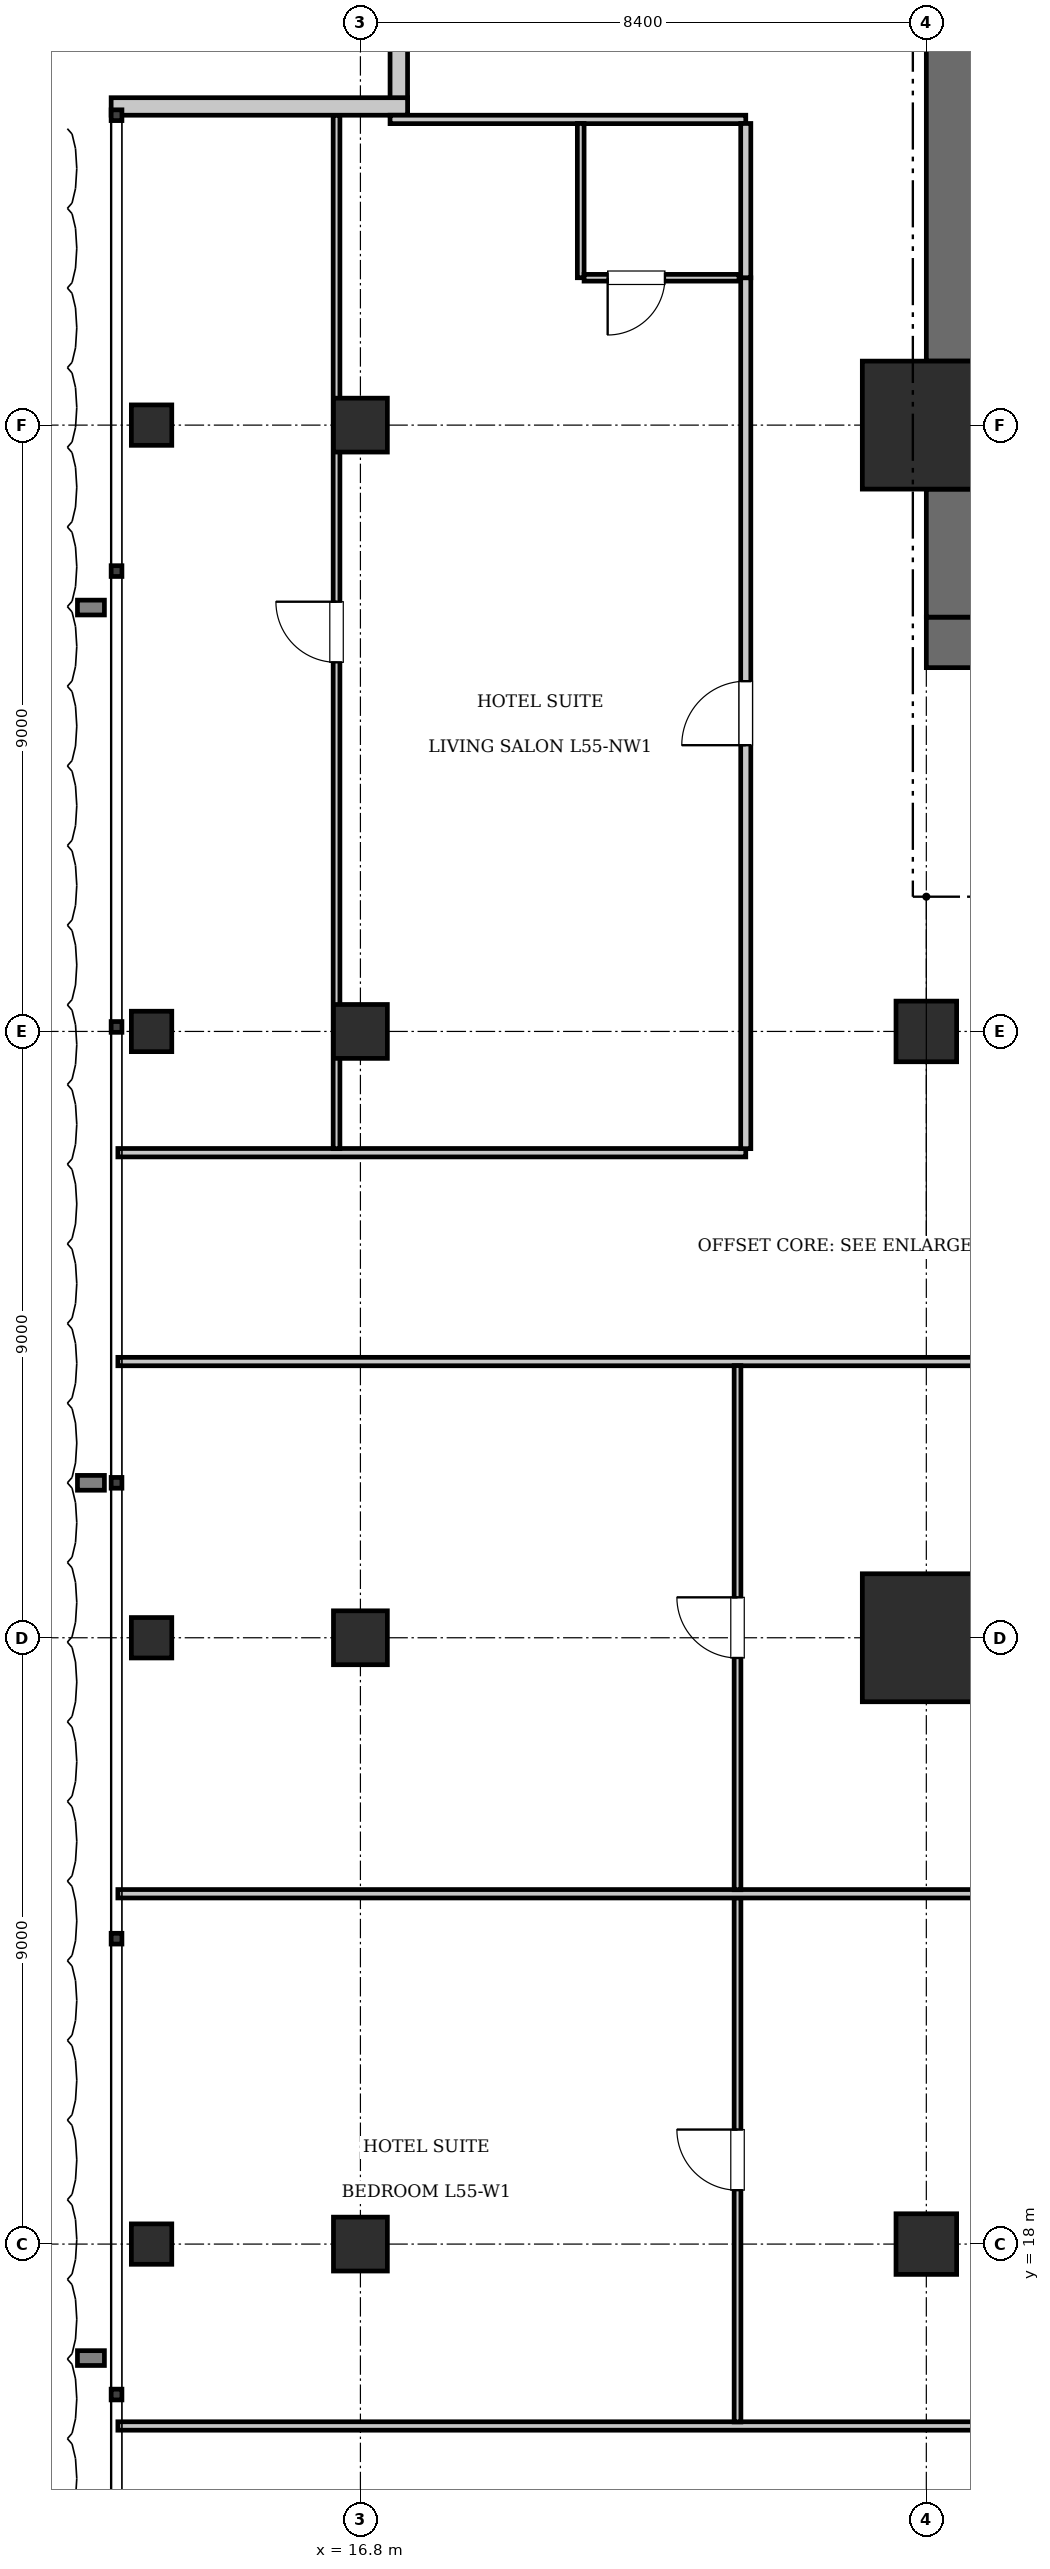
"""IFC4 building model, lengths in metres.
Left out: names, types, materials, properties, quantities, classifications, styles, units other than length and angle.
Written with IfcOpenShell. Run it as: python <this file> out.ifc"""

import sys

from ifc_helpers import new_model, si_unit, direction, frame, frame_2d, origin, origin_2d, place, context, subcontext, project, spatial, rectangle, i_section, extrude, element, fill, save


model = new_model("IFC4")
c1 = context("Model", 3, precision=1e-05, world=origin(), true_north=direction((0.0, 1.0)))
c2 = subcontext(c1, "Body", "Model", "MODEL_VIEW")
j1 = project(units=[si_unit("LENGTHUNIT", "METRE"), si_unit("PLANEANGLEUNIT", "RADIAN")], contexts=[c1])
p1 = place(None, origin())
s1 = spatial("IfcSite", under=j1, at=p1, CompositionType="ELEMENT")
p2 = place(p1, origin())
s2 = spatial("IfcBuilding", under=s1, at=p2, CompositionType="ELEMENT")
p3 = place(p2, frame((0.0, 0.0, 223.65)))
s3 = spatial("IfcBuildingStorey", under=s2, at=p3, CompositionType="ELEMENT", Elevation=223.65)
for number, where, z_axis, x_axis in (
    (1, (25.2, 27.0, 0.0), (0.0, 0.0, 1.0), (1.0, 0.0, 0.0)),
    (2, (25.2, 45.0, 0.0), (0.0, 0.0, 1.0), (1.0, 0.0, 0.0)),
):
    element("IfcColumn", number, at=place(p3, frame(where, z_axis=z_axis, x_axis=x_axis)), inside=s3, PredefinedType="COLUMN", context=c2, shape_type="SweptSolid", body=[
        extrude(rectangle(XDim=1.9, YDim=1.9, at=origin_2d()), origin(), (0.0, 0.0, 1.0), 3.85),
    ])
p4 = place(p3, frame((25.2, 41.775, 0.0), z_axis=(0.0, 0.0, 1.0), x_axis=(1.0, 0.0, 0.0)))
e3 = element("IfcWall", 3, at=p4, inside=s3, PredefinedType="SHEAR", context=c2, shape_type="SweptSolid", body=[
    extrude(rectangle(XDim=6.8, YDim=0.75, at=frame_2d((3.4, 0.0))), origin(), (0.0, 0.0, 1.0), 3.85),
])
p5 = place(p4, frame((1.65, 0.0, 0.0)))
e4 = element("IfcOpeningElement", 4, at=p5, cuts=e3, PredefinedType="OPENING", context=c2, shape_type="SweptSolid", body=[
    extrude(rectangle(XDim=1.15, YDim=2.15, at=frame_2d((0.575, 1.075))), frame((0.0, 0.385, 0.0), z_axis=(0.0, -1.0, 0.0), x_axis=(1.0, 0.0, 0.0)), (0.0, 0.0, 1.0), 0.77),
])
p6 = place(p4, frame((5.15, 0.0, 0.0)))
e5 = element("IfcOpeningElement", 5, at=p6, cuts=e3, PredefinedType="OPENING", context=c2, shape_type="SweptSolid", body=[
    extrude(rectangle(XDim=1.1, YDim=2.2, at=frame_2d((0.55, 1.1))), frame((0.0, 0.385, 0.0), z_axis=(0.0, -1.0, 0.0), x_axis=(1.0, 0.0, 0.0)), (0.0, 0.0, 1.0), 0.77),
])
p7 = place(p3, frame((25.575, 42.15, 0.0), z_axis=(0.0, 0.0, 1.0), x_axis=(0.0, 1.0, 0.0)))
e6 = element("IfcWall", 6, at=p7, inside=s3, PredefinedType="SHEAR", context=c2, shape_type="SweptSolid", body=[
    extrude(rectangle(XDim=1.9, YDim=0.75, at=frame_2d((0.95, 0.0))), origin(), (0.0, 0.0, 1.0), 3.85),
])
p8 = place(p3, frame((25.575, 45.95, 0.0), z_axis=(0.0, 0.0, 1.0), x_axis=(0.0, 1.0, 0.0)))
e7 = element("IfcWall", 7, at=p8, inside=s3, PredefinedType="SHEAR", context=c2, shape_type="SweptSolid", body=[
    extrude(rectangle(XDim=7.3, YDim=0.75, at=frame_2d((3.65, 0.0))), origin(), (0.0, 0.0, 1.0), 3.85),
])
for number, where, z_axis, x_axis in (
    (8, (25.2, 36.0, 0.0), (0.0, 0.0, 1.0), (1.0, 0.0, 0.0)),
    (9, (25.2, 18.0, 0.0), (0.0, 0.0, 1.0), (1.0, 0.0, 0.0)),
):
    element("IfcColumn", number, at=place(p3, frame(where, z_axis=z_axis, x_axis=x_axis)), inside=s3, PredefinedType="COLUMN", context=c2, shape_type="SweptSolid", body=[
        extrude(rectangle(XDim=0.9, YDim=0.9, at=origin_2d()), origin(), (0.0, 0.0, 1.0), 3.85),
    ])
for number, where, z_axis, x_axis in (
    (10, (16.8, 18.0, 0.0), (0.0, 0.0, 1.0), (1.0, 0.0, 0.0)),
    (11, (16.8, 27.0, 0.0), (0.0, 0.0, 1.0), (1.0, 0.0, 0.0)),
    (12, (16.8, 36.0, 0.0), (0.0, 0.0, 1.0), (1.0, 0.0, 0.0)),
    (13, (16.8, 45.0, 0.0), (0.0, 0.0, 1.0), (1.0, 0.0, 0.0)),
):
    element("IfcColumn", number, at=place(p3, frame(where, z_axis=z_axis, x_axis=x_axis)), inside=s3, PredefinedType="COLUMN", context=c2, shape_type="SweptSolid", body=[
        extrude(rectangle(XDim=0.8, YDim=0.8, at=origin_2d()), origin(), (0.0, 0.0, 1.0), 3.85),
    ])
for number, where, z_axis, x_axis in (
    (14, (13.7, 18.0, 0.0), (0.0, 0.0, 1.0), (1.0, 0.0, 0.0)),
    (15, (13.7, 27.0, 0.0), (0.0, 0.0, 1.0), (1.0, 0.0, 0.0)),
    (16, (13.7, 36.0, 0.0), (0.0, 0.0, 1.0), (1.0, 0.0, 0.0)),
    (17, (13.7, 45.0, 0.0), (0.0, 0.0, 1.0), (1.0, 0.0, 0.0)),
):
    element("IfcColumn", number, at=place(p3, frame(where, z_axis=z_axis, x_axis=x_axis)), inside=s3, PredefinedType="COLUMN", context=c2, shape_type="SweptSolid", body=[
        extrude(i_section(OverallWidth=0.6, OverallDepth=0.6, WebThickness=0.025, FlangeThickness=0.038, at=origin_2d()), origin(), (0.0, 0.0, 1.0), 3.85),
    ])
for number, where, z_axis, x_axis in (
    (18, (17.37, 49.6, 0.0), (0.0, 0.0, 1.0), (0.0, 1.0, 0.0)),
    (19, (13.1, 49.73, 0.0), (0.0, 0.0, 1.0), (1.0, 0.0, 0.0)),
):
    element("IfcWall", number, at=place(p3, frame(where, z_axis=z_axis, x_axis=x_axis)), inside=s3, PredefinedType="SOLIDWALL", context=c2, shape_type="SweptSolid", body=[
        extrude(rectangle(XDim=4.4, YDim=0.26, at=frame_2d((2.2, 0.0))), origin(), (0.0, 0.0, 1.0), 3.55),
    ])
for number, where, z_axis, x_axis in (
    (20, (13.2, 15.3, 0.0), (0.0, 0.0, 1.0), (1.0, 0.0, 0.0)),
    (21, (13.2, 31.1, 0.0), (0.0, 0.0, 1.0), (1.0, 0.0, 0.0)),
):
    element("IfcWall", number, at=place(p3, frame(where, z_axis=z_axis, x_axis=x_axis)), inside=s3, PredefinedType="PARTITIONING", context=c2, shape_type="SweptSolid", body=[
        extrude(rectangle(XDim=21.72, YDim=0.125, at=frame_2d((10.86, 0.0))), origin(), (0.0, 0.0, 1.0), 3.55),
    ])
p9 = place(p3, frame((22.398, 15.36, 0.0), z_axis=(0.0, 0.0, 1.0), x_axis=(0.0, 1.0, 0.0)))
e22 = element("IfcWall", 22, at=p9, inside=s3, PredefinedType="PARTITIONING", context=c2, shape_type="SweptSolid", body=[
    extrude(rectangle(XDim=7.78, YDim=0.1, at=frame_2d((3.89, 0.0))), origin(), (0.0, 0.0, 1.0), 3.55),
])
p10 = place(p9, frame((3.44, 0.0, 0.0)))
e23 = element("IfcOpeningElement", 23, at=p10, cuts=e22, PredefinedType="OPENING", context=c2, shape_type="SweptSolid", body=[
    extrude(rectangle(XDim=0.9, YDim=2.1, at=frame_2d((0.45, 1.05))), frame((0.0, 0.06, 0.0), z_axis=(0.0, -1.0, 0.0), x_axis=(1.0, 0.0, 0.0)), (0.0, 0.0, 1.0), 0.12),
])
p11 = place(p3, frame((13.2, 23.2, 0.0), z_axis=(0.0, 0.0, 1.0), x_axis=(1.0, 0.0, 0.0)))
e24 = element("IfcWall", 24, at=p11, inside=s3, PredefinedType="PARTITIONING", context=c2, shape_type="SweptSolid", body=[
    extrude(rectangle(XDim=21.72, YDim=0.125, at=frame_2d((10.86, 0.0))), origin(), (0.0, 0.0, 1.0), 3.55),
])
p12 = place(p3, frame((22.398, 23.26, 0.0), z_axis=(0.0, 0.0, 1.0), x_axis=(0.0, 1.0, 0.0)))
e25 = element("IfcWall", 25, at=p12, inside=s3, PredefinedType="PARTITIONING", context=c2, shape_type="SweptSolid", body=[
    extrude(rectangle(XDim=7.78, YDim=0.1, at=frame_2d((3.89, 0.0))), origin(), (0.0, 0.0, 1.0), 3.55),
])
p13 = place(p12, frame((3.44, 0.0, 0.0)))
e26 = element("IfcOpeningElement", 26, at=p13, cuts=e25, PredefinedType="OPENING", context=c2, shape_type="SweptSolid", body=[
    extrude(rectangle(XDim=0.9, YDim=2.1, at=frame_2d((0.45, 1.05))), frame((0.0, 0.06, 0.0), z_axis=(0.0, -1.0, 0.0), x_axis=(1.0, 0.0, 0.0)), (0.0, 0.0, 1.0), 0.12),
])
p14 = place(p3, frame((13.2, 34.2, 0.0), z_axis=(0.0, 0.0, 1.0), x_axis=(1.0, 0.0, 0.0)))
e27 = element("IfcWall", 27, at=p14, inside=s3, PredefinedType="PARTITIONING", context=c2, shape_type="SweptSolid", body=[
    extrude(rectangle(XDim=9.32, YDim=0.125, at=frame_2d((4.66, 0.0))), origin(), (0.0, 0.0, 1.0), 3.55),
])
p15 = place(p3, frame((17.24, 49.538, 0.0), z_axis=(0.0, 0.0, 1.0), x_axis=(1.0, 0.0, 0.0)))
e28 = element("IfcWall", 28, at=p15, inside=s3, PredefinedType="PARTITIONING", context=c2, shape_type="SweptSolid", body=[
    extrude(rectangle(XDim=5.28, YDim=0.125, at=frame_2d((2.64, 0.0))), origin(), (0.0, 0.0, 1.0), 3.55),
])
p16 = place(p3, frame((22.52, 34.26, 0.0), z_axis=(0.0, 0.0, 1.0), x_axis=(0.0, 1.0, 0.0)))
e29 = element("IfcWall", 29, at=p16, inside=s3, PredefinedType="PARTITIONING", context=c2, shape_type="SweptSolid", body=[
    extrude(rectangle(XDim=12.927, YDim=0.15, at=frame_2d((6.464, 0.0))), origin(), (0.0, 0.0, 1.0), 3.55),
])
p17 = place(p16, frame((5.989, 0.0, 0.0)))
e30 = element("IfcOpeningElement", 30, at=p17, cuts=e29, PredefinedType="OPENING", context=c2, shape_type="SweptSolid", body=[
    extrude(rectangle(XDim=0.95, YDim=2.15, at=frame_2d((0.475, 1.075))), frame((0.0, 0.085, 0.0), z_axis=(0.0, -1.0, 0.0), x_axis=(1.0, 0.0, 0.0)), (0.0, 0.0, 1.0), 0.17),
])
p18 = place(p3, frame((22.52, 47.188, 0.0), z_axis=(0.0, 0.0, 1.0), x_axis=(0.0, 1.0, 0.0)))
e31 = element("IfcWall", 31, at=p18, inside=s3, PredefinedType="PARTITIONING", context=c2, shape_type="SweptSolid", body=[
    extrude(rectangle(XDim=2.29, YDim=0.15, at=frame_2d((1.145, 0.0))), origin(), (0.0, 0.0, 1.0), 3.55),
])
p19 = place(p3, frame((20.07, 47.188, 0.0), z_axis=(0.0, 0.0, 1.0), x_axis=(0.0, 1.0, 0.0)))
e32 = element("IfcWall", 32, at=p19, inside=s3, PredefinedType="PARTITIONING", context=c2, shape_type="SweptSolid", body=[
    extrude(rectangle(XDim=2.29, YDim=0.1, at=frame_2d((1.145, 0.0))), origin(), (0.0, 0.0, 1.0), 3.55),
])
p20 = place(p3, frame((20.12, 47.188, 0.0), z_axis=(0.0, 0.0, 1.0), x_axis=(1.0, 0.0, 0.0)))
e33 = element("IfcWall", 33, at=p20, inside=s3, PredefinedType="PARTITIONING", context=c2, shape_type="SweptSolid", body=[
    extrude(rectangle(XDim=2.3, YDim=0.1, at=frame_2d((1.15, 0.0))), origin(), (0.0, 0.0, 1.0), 3.55),
])
p21 = place(p20, frame((0.35, 0.0, 0.0)))
e34 = element("IfcOpeningElement", 34, at=p21, cuts=e33, PredefinedType="OPENING", context=c2, shape_type="SweptSolid", body=[
    extrude(rectangle(XDim=0.85, YDim=2.1, at=frame_2d((0.425, 1.05))), frame((0.0, 0.06, 0.0), z_axis=(0.0, -1.0, 0.0), x_axis=(1.0, 0.0, 0.0)), (0.0, 0.0, 1.0), 0.12),
])
p22 = place(p3, frame((16.446, 34.26, 0.0), z_axis=(0.0, 0.0, 1.0), x_axis=(0.0, 1.0, 0.0)))
e35 = element("IfcWall", 35, at=p22, inside=s3, PredefinedType="PARTITIONING", context=c2, shape_type="SweptSolid", body=[
    extrude(rectangle(XDim=15.337, YDim=0.1, at=frame_2d((7.669, 0.0))), origin(), (0.0, 0.0, 1.0), 3.55),
])
p23 = place(p22, frame((7.219, 0.0, 0.0)))
e36 = element("IfcOpeningElement", 36, at=p23, cuts=e35, PredefinedType="OPENING", context=c2, shape_type="SweptSolid", body=[
    extrude(rectangle(XDim=0.9, YDim=2.1, at=frame_2d((0.45, 1.05))), frame((0.0, 0.06, 0.0), z_axis=(0.0, -1.0, 0.0), x_axis=(1.0, 0.0, 0.0)), (0.0, 0.0, 1.0), 0.12),
])
p24 = place(p10, origin())
e37 = element("IfcDoor", 37, at=p24, inside=s3, OperationType="SINGLE_SWING_RIGHT", PredefinedType="DOOR", context=c2, shape_type="SweptSolid", body=[
    extrude(rectangle(XDim=0.9, YDim=2.1, at=frame_2d((0.45, 1.05))), frame((0.0, 0.025, 0.0), z_axis=(0.0, -1.0, 0.0), x_axis=(1.0, 0.0, 0.0)), (0.0, 0.0, 1.0), 0.05),
])
fill(e23, e37)
p25 = place(p13, origin())
e38 = element("IfcDoor", 38, at=p25, inside=s3, OperationType="SINGLE_SWING_RIGHT", PredefinedType="DOOR", context=c2, shape_type="SweptSolid", body=[
    extrude(rectangle(XDim=0.9, YDim=2.1, at=frame_2d((0.45, 1.05))), frame((0.0, 0.025, 0.0), z_axis=(0.0, -1.0, 0.0), x_axis=(1.0, 0.0, 0.0)), (0.0, 0.0, 1.0), 0.05),
])
fill(e26, e38)
p26 = place(p21, frame((0.85, 0.0, 0.0), z_axis=(0.0, 0.0, 1.0), x_axis=(-1.0, 0.0, 0.0)))
e39 = element("IfcDoor", 39, at=p26, inside=s3, OperationType="SINGLE_SWING_RIGHT", PredefinedType="DOOR", context=c2, shape_type="SweptSolid", body=[
    extrude(rectangle(XDim=0.85, YDim=2.1, at=frame_2d((0.425, 1.05))), frame((0.0, 0.025, 0.0), z_axis=(0.0, -1.0, 0.0), x_axis=(1.0, 0.0, 0.0)), (0.0, 0.0, 1.0), 0.05),
])
fill(e34, e39)
p27 = place(p17, origin())
e40 = element("IfcDoor", 40, at=p27, inside=s3, OperationType="SINGLE_SWING_LEFT", PredefinedType="DOOR", context=c2, shape_type="SweptSolid", body=[
    extrude(rectangle(XDim=0.95, YDim=2.15, at=frame_2d((0.475, 1.075))), frame((0.0, 0.025, 0.0), z_axis=(0.0, -1.0, 0.0), x_axis=(1.0, 0.0, 0.0)), (0.0, 0.0, 1.0), 0.05),
])
fill(e30, e40)
p28 = place(p23, origin())
e41 = element("IfcDoor", 41, at=p28, inside=s3, OperationType="SINGLE_SWING_RIGHT", PredefinedType="DOOR", context=c2, shape_type="SweptSolid", body=[
    extrude(rectangle(XDim=0.9, YDim=2.1, at=frame_2d((0.45, 1.05))), frame((0.0, 0.025, 0.0), z_axis=(0.0, -1.0, 0.0), x_axis=(1.0, 0.0, 0.0)), (0.0, 0.0, 1.0), 0.05),
])
fill(e36, e41)
save(model, sys.argv[1])
